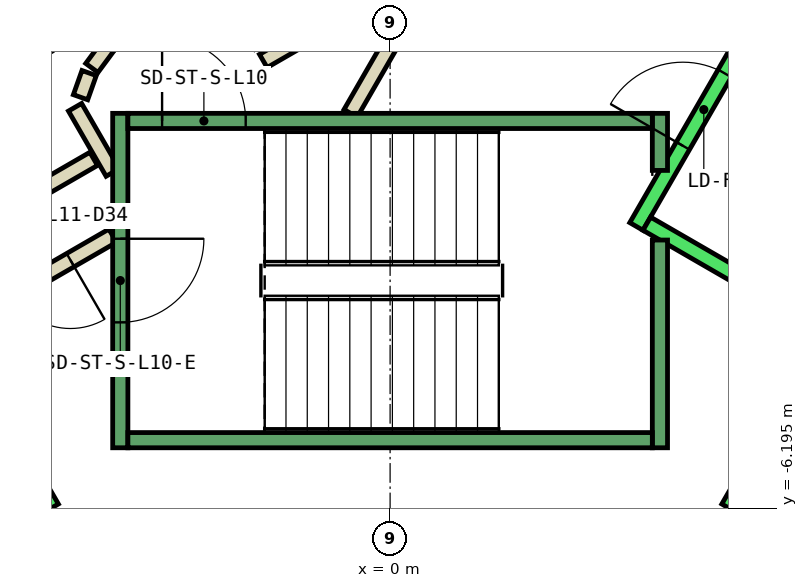
"""IFC4 building model, lengths in metres.
Left out: names, types, materials, properties, quantities, classifications, styles, units other than length and angle.
Written with IfcOpenShell. Run it as: python <this file> out.ifc"""

import sys

from ifc_helpers import new_model, si_unit, direction, frame, frame_2d, origin, place, context, subcontext, project, spatial, rectangle, extrude, element, fill, save


model = new_model("IFC4")
c1 = context("Model", 3, precision=1e-05, world=origin(), true_north=direction((0.0, 1.0)))
c2 = subcontext(c1, "Body", "Model", "MODEL_VIEW")
j1 = project(units=[si_unit("LENGTHUNIT", "METRE"), si_unit("PLANEANGLEUNIT", "RADIAN")], contexts=[c1])
p1 = place(None, origin())
s1 = spatial("IfcSite", under=j1, at=p1, CompositionType="ELEMENT")
p2 = place(p1, origin())
s2 = spatial("IfcBuilding", under=s1, at=p2, CompositionType="ELEMENT")
p3 = place(p2, frame((0.0, 0.0, 51.8)))
s3 = spatial("IfcBuildingStorey", under=s2, at=p3, CompositionType="ELEMENT", Elevation=51.8)
p4 = place(p3, frame((-3.9, -1.599, 0.0), z_axis=(0.0, 0.0, 1.0), x_axis=(-0.865969445389, -0.500096910261, 0.0)))
e1 = element("IfcWall", 1, at=p4, inside=s3, PredefinedType="PARTITIONING", context=c2, shape_type="SweptSolid", body=[
    extrude(rectangle(XDim=1.373, YDim=0.2, at=frame_2d((0.687, 0.0))), origin(), (0.0, 0.0, 1.0), 3.8),
])
p5 = place(p3, frame((-3.65, -2.61, 0.0), z_axis=(0.0, 0.0, 1.0), x_axis=(-0.866072462134, -0.499918483688, 0.0)))
e2 = element("IfcWall", 2, at=p5, inside=s3, PredefinedType="PARTITIONING", context=c2, shape_type="SweptSolid", body=[
    extrude(rectangle(XDim=2.084, YDim=0.2, at=frame_2d((1.042, 0.0))), origin(), (0.0, 0.0, 1.0), 3.8),
])
p6 = place(p5, frame((0.642, 0.0, 0.0)))
e3 = element("IfcOpeningElement", 3, at=p6, cuts=e2, PredefinedType="OPENING", context=c2, shape_type="SweptSolid", body=[
    extrude(rectangle(XDim=0.9, YDim=2.1, at=frame_2d((0.45, 1.05))), frame((0.0, 0.11, 0.0), z_axis=(0.0, -1.0, 0.0), x_axis=(1.0, 0.0, 0.0)), (0.0, 0.0, 1.0), 0.22),
])
p7 = place(p3, frame((-4.145, -0.92, 0.0), z_axis=(0.0, 0.0, 1.0), x_axis=(0.499743786207, -0.866173278362, 0.0)))
e4 = element("IfcWall", 4, at=p7, inside=s3, PredefinedType="PARTITIONING", context=c2, shape_type="SweptSolid", body=[
    extrude(rectangle(XDim=0.991, YDim=0.2, at=frame_2d((0.495, 0.0))), origin(), (0.0, 0.0, 1.0), 3.8),
])
p8 = place(p3, frame((-0.52, -1.0, 0.0), z_axis=(0.0, 0.0, 1.0), x_axis=(0.50011622646, 0.865958290007, 0.0)))
e5 = element("IfcWall", 5, at=p8, inside=s3, PredefinedType="PARTITIONING", context=c2, shape_type="SweptSolid", body=[
    extrude(rectangle(XDim=4.991, YDim=0.2, at=frame_2d((2.496, 0.0))), origin(), (0.0, 0.0, 1.0), 3.8),
])
p9 = place(p8, frame((1.945, 0.0, 0.0)))
e6 = element("IfcOpeningElement", 6, at=p9, cuts=e5, PredefinedType="OPENING", context=c2, shape_type="SweptSolid", body=[
    extrude(rectangle(XDim=1.0, YDim=2.1, at=frame_2d((0.5, 1.05))), frame((0.0, 0.11, 0.0), z_axis=(0.0, -1.0, 0.0), x_axis=(1.0, 0.0, 0.0)), (0.0, 0.0, 1.0), 0.22),
])
p10 = place(p3, frame((-0.412, 0.414, 0.0), z_axis=(0.0, 0.0, 1.0), x_axis=(-0.866017369001, -0.500013916395, 0.0)))
e7 = element("IfcWall", 7, at=p10, inside=s3, PredefinedType="PARTITIONING", context=c2, shape_type="SweptSolid", body=[
    extrude(rectangle(XDim=1.45, YDim=0.2, at=frame_2d((0.725, 0.0))), origin(), (0.0, 0.0, 1.0), 3.8),
])
p11 = place(p3, frame((-3.723, -0.131, 0.0), z_axis=(0.0, 0.0, 1.0), x_axis=(-0.594675113454, -0.803966112121, 0.0)))
e8 = element("IfcWall", 8, at=p11, inside=s3, PredefinedType="PARTITIONING", context=c2, shape_type="SweptSolid", body=[
    extrude(rectangle(XDim=0.338, YDim=0.2, at=frame_2d((0.169, 0.0))), origin(), (0.0, 0.0, 1.0), 3.8),
])
p12 = place(p3, frame((-3.96, -0.47, 0.0), z_axis=(0.0, 0.0, 1.0), x_axis=(-0.334824194261, -0.942280615813, 0.0)))
e9 = element("IfcWall", 9, at=p12, inside=s3, PredefinedType="PARTITIONING", context=c2, shape_type="SweptSolid", body=[
    extrude(rectangle(XDim=0.338, YDim=0.2, at=frame_2d((0.169, 0.0))), origin(), (0.0, 0.0, 1.0), 3.8),
])
p13 = place(p3, frame((-9.751, 2.99, 0.0), z_axis=(0.0, 0.0, 1.0), x_axis=(0.50000090737, -0.866024879913, 0.0)))
e10 = element("IfcWall", 10, at=p13, inside=s3, PredefinedType="STANDARD", context=c2, shape_type="SweptSolid", body=[
    extrude(rectangle(XDim=10.6, YDim=0.2, at=frame_2d((5.3, 0.0))), origin(), (0.0, 0.0, 1.0), 3.8),
])
p14 = place(p3, frame((3.24, -2.488, 0.0), z_axis=(0.0, 0.0, 1.0), x_axis=(0.49994636267, 0.866056369097, 0.0)))
e11 = element("IfcWall", 11, at=p14, inside=s3, PredefinedType="STANDARD", context=c2, shape_type="SweptSolid", body=[
    extrude(rectangle(XDim=2.8, YDim=0.2, at=frame_2d((1.4, 0.0))), origin(), (0.0, 0.0, 1.0), 3.8),
])
p15 = place(p14, frame((1.225, 0.0, 0.0)))
e12 = element("IfcOpeningElement", 12, at=p15, cuts=e11, PredefinedType="OPENING", context=c2, shape_type="SweptSolid", body=[
    extrude(rectangle(XDim=1.1, YDim=2.1, at=frame_2d((0.55, 1.05))), frame((0.0, 0.11, 0.0), z_axis=(0.0, -1.0, 0.0), x_axis=(1.0, 0.0, 0.0)), (0.0, 0.0, 1.0), 0.22),
])
p16 = place(p3, frame((3.377, -2.452, 0.0), z_axis=(0.0, 0.0, 1.0), x_axis=(0.865955154139, -0.50012165622, 0.0)))
e13 = element("IfcWall", 13, at=p16, inside=s3, PredefinedType="STANDARD", context=c2, shape_type="SweptSolid", body=[
    extrude(rectangle(XDim=2.4, YDim=0.2, at=frame_2d((1.2, 0.0))), origin(), (0.0, 0.0, 1.0), 3.8),
])
p17 = place(p3, frame((4.451, -6.19, 0.0), z_axis=(0.0, 0.0, 1.0), x_axis=(0.50000090737, 0.866024879913, 0.0)))
e14 = element("IfcWall", 14, at=p17, inside=s3, PredefinedType="STANDARD", context=c2, shape_type="SweptSolid", body=[
    extrude(rectangle(XDim=10.6, YDim=0.2, at=frame_2d((5.3, 0.0))), origin(), (0.0, 0.0, 1.0), 3.8),
])
p18 = place(p3, frame((-3.55, -1.0, 0.0), z_axis=(0.0, 0.0, 1.0), x_axis=(0.0, -1.0, 0.0)))
e15 = element("IfcWall", 15, at=p18, inside=s3, PredefinedType="STANDARD", context=c2, shape_type="SweptSolid", body=[
    extrude(rectangle(XDim=4.4, YDim=0.2, at=frame_2d((2.2, 0.0))), origin(), (0.0, 0.0, 1.0), 3.8),
])
p19 = place(p18, frame((1.65, 0.0, 0.0)))
e16 = element("IfcOpeningElement", 16, at=p19, cuts=e15, PredefinedType="OPENING", context=c2, shape_type="SweptSolid", body=[
    extrude(rectangle(XDim=1.1, YDim=2.2, at=frame_2d((0.55, 1.1))), frame((0.0, 0.11, 0.0), z_axis=(0.0, -1.0, 0.0), x_axis=(1.0, 0.0, 0.0)), (0.0, 0.0, 1.0), 0.22),
])
p20 = place(p3, frame((3.55, -2.667, 0.0), z_axis=(0.0, 0.0, 1.0), x_axis=(0.0, -1.0, 0.0)))
e17 = element("IfcWall", 17, at=p20, inside=s3, PredefinedType="STANDARD", context=c2, shape_type="SweptSolid", body=[
    extrude(rectangle(XDim=2.733, YDim=0.2, at=frame_2d((1.366, 0.0))), origin(), (0.0, 0.0, 1.0), 3.8),
])
p21 = place(p3, frame((3.55, -1.0, 0.0), z_axis=(0.0, 0.0, 1.0), x_axis=(0.0, -1.0, 0.0)))
e18 = element("IfcWall", 18, at=p21, inside=s3, PredefinedType="STANDARD", context=c2, shape_type="SweptSolid", body=[
    extrude(rectangle(XDim=0.751, YDim=0.2, at=frame_2d((0.375, 0.0))), origin(), (0.0, 0.0, 1.0), 3.8),
])
p22 = place(p3, frame((-3.45, -1.1, 0.0), z_axis=(0.0, 0.0, 1.0), x_axis=(1.0, 0.0, 0.0)))
e19 = element("IfcWall", 19, at=p22, inside=s3, PredefinedType="STANDARD", context=c2, shape_type="SweptSolid", body=[
    extrude(rectangle(XDim=6.9, YDim=0.2, at=frame_2d((3.45, 0.0))), origin(), (0.0, 0.0, 1.0), 3.8),
])
p23 = place(p22, frame((0.45, 0.0, 0.0)))
e20 = element("IfcOpeningElement", 20, at=p23, cuts=e19, PredefinedType="OPENING", context=c2, shape_type="SweptSolid", body=[
    extrude(rectangle(XDim=1.1, YDim=2.2, at=frame_2d((0.55, 1.1))), frame((0.0, 0.11, 0.0), z_axis=(0.0, -1.0, 0.0), x_axis=(1.0, 0.0, 0.0)), (0.0, 0.0, 1.0), 0.22),
])
p24 = place(p3, frame((-3.45, -5.3, 0.0), z_axis=(0.0, 0.0, 1.0), x_axis=(1.0, 0.0, 0.0)))
e21 = element("IfcWall", 21, at=p24, inside=s3, PredefinedType="STANDARD", context=c2, shape_type="SweptSolid", body=[
    extrude(rectangle(XDim=6.9, YDim=0.2, at=frame_2d((3.45, 0.0))), origin(), (0.0, 0.0, 1.0), 3.8),
])
p25 = place(p6, origin())
e22 = element("IfcDoor", 22, at=p25, inside=s3, OperationType="SINGLE_SWING_LEFT", PredefinedType="DOOR", context=c2, shape_type="SweptSolid", body=[
    extrude(rectangle(XDim=0.9, YDim=2.1, at=frame_2d((0.45, 1.05))), frame((0.0, 0.025, 0.0), z_axis=(0.0, -1.0, 0.0), x_axis=(1.0, 0.0, 0.0)), (0.0, 0.0, 1.0), 0.05),
])
fill(e3, e22)
p26 = place(p15, origin())
e23 = element("IfcDoor", 23, at=p26, inside=s3, OperationType="SLIDING_TO_LEFT", PredefinedType="DOOR", context=c2, shape_type="SweptSolid", body=[
    extrude(rectangle(XDim=1.1, YDim=2.1, at=frame_2d((0.55, 1.05))), frame((0.0, 0.025, 0.0), z_axis=(0.0, -1.0, 0.0), x_axis=(1.0, 0.0, 0.0)), (0.0, 0.0, 1.0), 0.05),
])
fill(e12, e23)
p27 = place(p23, origin())
e24 = element("IfcDoor", 24, at=p27, inside=s3, OperationType="SINGLE_SWING_LEFT", PredefinedType="DOOR", context=c2, shape_type="SweptSolid", body=[
    extrude(rectangle(XDim=1.1, YDim=2.2, at=frame_2d((0.55, 1.1))), frame((0.0, 0.025, 0.0), z_axis=(0.0, -1.0, 0.0), x_axis=(1.0, 0.0, 0.0)), (0.0, 0.0, 1.0), 0.05),
])
fill(e20, e24)
p28 = place(p19, origin())
e25 = element("IfcDoor", 25, at=p28, inside=s3, OperationType="SINGLE_SWING_LEFT", PredefinedType="DOOR", context=c2, shape_type="SweptSolid", body=[
    extrude(rectangle(XDim=1.1, YDim=2.2, at=frame_2d((0.55, 1.1))), frame((0.0, 0.025, 0.0), z_axis=(0.0, -1.0, 0.0), x_axis=(1.0, 0.0, 0.0)), (0.0, 0.0, 1.0), 0.05),
])
fill(e16, e25)
save(model, sys.argv[1])
